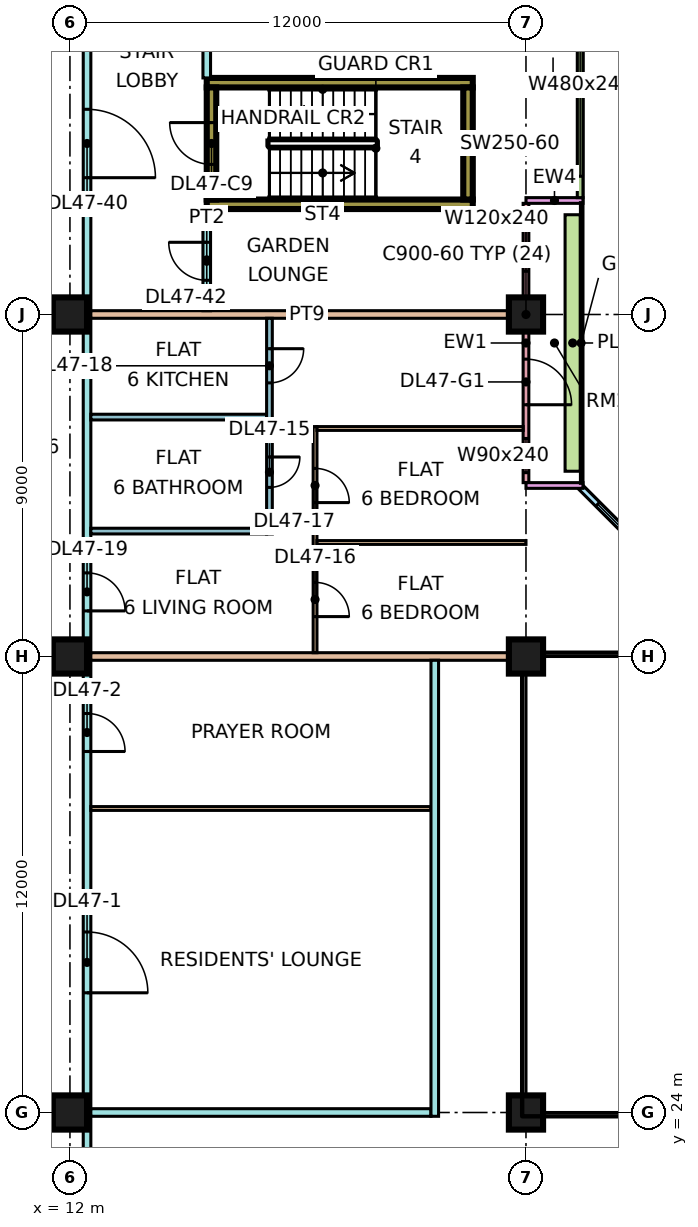
"""IFC4 building model, lengths in metres.
Left out: names, types, materials, properties, quantities, classifications, styles, units other than length and angle.
Written with IfcOpenShell. Run it as: python <this file> out.ifc"""

import sys

from ifc_helpers import new_model, si_unit, direction, frame, frame_2d, origin, origin_2d, place, context, subcontext, project, spatial, rectangle, extrude, element, fill, save


model = new_model("IFC4")
c1 = context("Model", 3, precision=1e-05, world=origin(), true_north=direction((0.0, 1.0)))
c2 = subcontext(c1, "Body", "Model", "MODEL_VIEW")
j1 = project(units=[si_unit("LENGTHUNIT", "METRE"), si_unit("PLANEANGLEUNIT", "RADIAN")], contexts=[c1])
p1 = place(None, origin())
s1 = spatial("IfcSite", under=j1, at=p1, CompositionType="ELEMENT")
p2 = place(p1, origin())
s2 = spatial("IfcBuilding", under=s1, at=p2, CompositionType="ELEMENT")
p3 = place(p2, frame((0.0, 0.0, 202.4)))
s3 = spatial("IfcBuildingStorey", under=s2, at=p3, CompositionType="ELEMENT", Elevation=202.4)
for number, where, z_axis, x_axis in (
    (1, (12.0, 24.0, 0.0), (0.0, 0.0, 1.0), (1.0, 0.0, 0.0)),
    (2, (12.0, 36.0, 0.0), (0.0, 0.0, 1.0), (1.0, 0.0, 0.0)),
    (3, (12.0, 45.0, 0.0), (0.0, 0.0, 1.0), (1.0, 0.0, 0.0)),
    (4, (24.0, 24.0, 0.0), (0.0, 0.0, 1.0), (1.0, 0.0, 0.0)),
    (5, (24.0, 36.0, 0.0), (0.0, 0.0, 1.0), (1.0, 0.0, 0.0)),
    (6, (24.0, 45.0, 0.0), (0.0, 0.0, 1.0), (1.0, 0.0, 0.0)),
):
    element("IfcColumn", number, at=place(p3, frame(where, z_axis=z_axis, x_axis=x_axis)), inside=s3, PredefinedType="COLUMN", context=c2, shape_type="SweptSolid", body=[
        extrude(rectangle(XDim=0.9, YDim=0.9, at=origin_2d()), origin(), (0.0, 0.0, 1.0), 3.75),
    ])
for number, where, z_axis, x_axis in (
    (7, (15.6, 47.9, 0.0), (0.0, 0.0, 1.0), (1.0, 0.0, 0.0)),
    (8, (15.6, 51.1, 0.0), (0.0, 0.0, 1.0), (1.0, 0.0, 0.0)),
):
    element("IfcWall", number, at=place(p3, frame(where, z_axis=z_axis, x_axis=x_axis)), inside=s3, PredefinedType="SHEAR", context=c2, shape_type="SweptSolid", body=[
        extrude(rectangle(XDim=7.0, YDim=0.25, at=frame_2d((3.5, 0.0))), origin(), (0.0, 0.0, 1.0), 3.75),
    ])
p4 = place(p3, frame((15.725, 48.025, 0.0), z_axis=(0.0, 0.0, 1.0), x_axis=(0.0, 1.0, 0.0)))
e9 = element("IfcWall", 9, at=p4, inside=s3, PredefinedType="SHEAR", context=c2, shape_type="SweptSolid", body=[
    extrude(rectangle(XDim=2.95, YDim=0.25, at=frame_2d((1.475, 0.0))), origin(), (0.0, 0.0, 1.0), 3.75),
])
p5 = place(p4, frame((0.925, 0.0, 0.0)))
e10 = element("IfcOpeningElement", 10, at=p5, cuts=e9, PredefinedType="OPENING", context=c2, shape_type="SweptSolid", body=[
    extrude(rectangle(XDim=1.1, YDim=2.2, at=frame_2d((0.55, 1.1))), frame((0.0, 0.135, 0.0), z_axis=(0.0, -1.0, 0.0), x_axis=(1.0, 0.0, 0.0)), (0.0, 0.0, 1.0), 0.27),
])
p6 = place(p3, frame((22.475, 48.025, 0.0), z_axis=(0.0, 0.0, 1.0), x_axis=(0.0, 1.0, 0.0)))
e11 = element("IfcWall", 11, at=p6, inside=s3, PredefinedType="SHEAR", context=c2, shape_type="SweptSolid", body=[
    extrude(rectangle(XDim=2.95, YDim=0.25, at=frame_2d((1.475, 0.0))), origin(), (0.0, 0.0, 1.0), 3.75),
])
p7 = place(p3, frame((28.447, 37.447, 0.0), z_axis=(0.0, 0.0, 1.0), x_axis=(-0.707106781187, 0.707106781187, 0.0)))
e12 = element("IfcWall", 12, at=p7, inside=s3, PredefinedType="SOLIDWALL", context=c2, shape_type="SweptSolid", body=[
    extrude(rectangle(XDim=4.243, YDim=0.15, at=frame_2d((2.121, 0.0))), origin(), (0.0, 0.0, 1.0), 3.3),
])
p8 = place(p7, frame((0.621, 0.0, 0.45)))
e13 = element("IfcOpeningElement", 13, at=p8, cuts=e12, PredefinedType="OPENING", context=c2, shape_type="SweptSolid", body=[
    extrude(rectangle(XDim=3.0, YDim=2.4, at=frame_2d((1.5, 1.2))), frame((0.0, 0.085, 0.0), z_axis=(0.0, -1.0, 0.0), x_axis=(1.0, 0.0, 0.0)), (0.0, 0.0, 1.0), 0.17),
])
p9 = place(p3, frame((24.0, 40.575, 0.0), z_axis=(0.0, 0.0, 1.0), x_axis=(0.0, 1.0, 0.0)))
e14 = element("IfcWall", 14, at=p9, inside=s3, PredefinedType="SOLIDWALL", context=c2, shape_type="SweptSolid", body=[
    extrude(rectangle(XDim=7.35, YDim=0.15, at=frame_2d((3.675, 0.0))), origin(), (0.0, 0.0, 1.0), 3.3),
])
p10 = place(p9, frame((0.262, 0.0, 0.45)))
e15 = element("IfcOpeningElement", 15, at=p10, cuts=e14, PredefinedType="OPENING", context=c2, shape_type="SweptSolid", body=[
    extrude(rectangle(XDim=0.9, YDim=2.4, at=frame_2d((0.45, 1.2))), frame((0.0, 0.085, 0.0), z_axis=(0.0, -1.0, 0.0), x_axis=(1.0, 0.0, 0.0)), (0.0, 0.0, 1.0), 0.17),
])
p11 = place(p9, frame((2.05, 0.0, 0.0)))
e16 = element("IfcOpeningElement", 16, at=p11, cuts=e14, PredefinedType="OPENING", context=c2, shape_type="SweptSolid", body=[
    extrude(rectangle(XDim=1.2, YDim=2.4, at=frame_2d((0.6, 1.2))), frame((0.0, 0.085, 0.0), z_axis=(0.0, -1.0, 0.0), x_axis=(1.0, 0.0, 0.0)), (0.0, 0.0, 1.0), 0.17),
])
p12 = place(p9, frame((5.562, 0.0, 0.45)))
e17 = element("IfcOpeningElement", 17, at=p12, cuts=e14, PredefinedType="OPENING", context=c2, shape_type="SweptSolid", body=[
    extrude(rectangle(XDim=1.2, YDim=2.4, at=frame_2d((0.6, 1.2))), frame((0.0, 0.085, 0.0), z_axis=(0.0, -1.0, 0.0), x_axis=(1.0, 0.0, 0.0)), (0.0, 0.0, 1.0), 0.17),
])
for number, where, z_axis, x_axis in (
    (18, (25.5, 40.5, 0.0), (0.0, 0.0, 1.0), (-1.0, 0.0, 0.0)),
    (19, (25.5, 48.0, 0.0), (0.0, 0.0, 1.0), (-1.0, 0.0, 0.0)),
):
    element("IfcWall", number, at=place(p3, frame(where, z_axis=z_axis, x_axis=x_axis)), inside=s3, PredefinedType="SOLIDWALL", context=c2, shape_type="SweptSolid", body=[
        extrude(rectangle(XDim=1.5, YDim=0.15, at=frame_2d((0.75, 0.0))), origin(), (0.0, 0.0, 1.0), 3.3),
    ])
p13 = place(p3, frame((25.425, 48.075, 0.0), z_axis=(0.0, 0.0, 1.0), x_axis=(0.0, 1.0, 0.0)))
e20 = element("IfcWall", 20, at=p13, inside=s3, PredefinedType="SOLIDWALL", context=c2, shape_type="SweptSolid", body=[
    extrude(rectangle(XDim=13.425, YDim=0.15, at=frame_2d((6.712, 0.0))), origin(), (0.0, 0.0, 1.0), 3.3),
])
p14 = place(p13, frame((0.562, 0.0, 0.45)))
e21 = element("IfcOpeningElement", 21, at=p14, cuts=e20, PredefinedType="OPENING", context=c2, shape_type="SweptSolid", body=[
    extrude(rectangle(XDim=4.8, YDim=2.4, at=frame_2d((2.4, 1.2))), frame((0.0, 0.085, 0.0), z_axis=(0.0, -1.0, 0.0), x_axis=(1.0, 0.0, 0.0)), (0.0, 0.0, 1.0), 0.17),
])
p15 = place(p13, frame((6.525, 0.0, 0.45)))
e22 = element("IfcOpeningElement", 22, at=p15, cuts=e20, PredefinedType="OPENING", context=c2, shape_type="SweptSolid", body=[
    extrude(rectangle(XDim=1.8, YDim=2.4, at=frame_2d((0.9, 1.2))), frame((0.0, 0.085, 0.0), z_axis=(0.0, -1.0, 0.0), x_axis=(1.0, 0.0, 0.0)), (0.0, 0.0, 1.0), 0.17),
])
p16 = place(p13, frame((9.525, 0.0, 0.45)))
e23 = element("IfcOpeningElement", 23, at=p16, cuts=e20, PredefinedType="OPENING", context=c2, shape_type="SweptSolid", body=[
    extrude(rectangle(XDim=1.8, YDim=2.4, at=frame_2d((0.9, 1.2))), frame((0.0, 0.085, 0.0), z_axis=(0.0, -1.0, 0.0), x_axis=(1.0, 0.0, 0.0)), (0.0, 0.0, 1.0), 0.17),
])
p17 = place(p13, frame((12.225, 0.0, 0.45)))
e24 = element("IfcOpeningElement", 24, at=p17, cuts=e20, PredefinedType="OPENING", context=c2, shape_type="SweptSolid", body=[
    extrude(rectangle(XDim=0.9, YDim=2.4, at=frame_2d((0.45, 1.2))), frame((0.0, 0.085, 0.0), z_axis=(0.0, -1.0, 0.0), x_axis=(1.0, 0.0, 0.0)), (0.0, 0.0, 1.0), 0.17),
])
p18 = place(p3, frame((25.229, 40.875, 0.0), z_axis=(0.0, 0.0, 1.0), x_axis=(0.0, 1.0, 0.0)))
e25 = element("IfcWall", 25, at=p18, inside=s3, PredefinedType="SOLIDWALL", context=c2, shape_type="SweptSolid", body=[
    extrude(rectangle(XDim=6.75, YDim=0.4, at=frame_2d((3.375, 0.0))), origin(), (0.0, 0.0, 1.0), 0.7),
])
p19 = place(p3, frame((12.45, 20.0, 0.0), z_axis=(0.0, 0.0, 1.0), x_axis=(0.0, 1.0, 0.0)))
e26 = element("IfcWall", 26, at=p19, inside=s3, PredefinedType="PARTITIONING", context=c2, shape_type="SweptSolid", body=[
    extrude(rectangle(XDim=42.926, YDim=0.2, at=frame_2d((21.463, 0.0))), origin(), (0.0, 0.0, 1.0), 3.3),
])
p20 = place(p19, frame((7.15, 0.0, 0.0)))
e27 = element("IfcOpeningElement", 27, at=p20, cuts=e26, PredefinedType="OPENING", context=c2, shape_type="SweptSolid", body=[
    extrude(rectangle(XDim=1.6, YDim=2.1, at=frame_2d((0.8, 1.05))), frame((0.0, 0.11, 0.0), z_axis=(0.0, -1.0, 0.0), x_axis=(1.0, 0.0, 0.0)), (0.0, 0.0, 1.0), 0.22),
])
p21 = place(p19, frame((13.5, 0.0, 0.0)))
e28 = element("IfcOpeningElement", 28, at=p21, cuts=e26, PredefinedType="OPENING", context=c2, shape_type="SweptSolid", body=[
    extrude(rectangle(XDim=1.0, YDim=2.1, at=frame_2d((0.5, 1.05))), frame((0.0, 0.11, 0.0), z_axis=(0.0, -1.0, 0.0), x_axis=(1.0, 0.0, 0.0)), (0.0, 0.0, 1.0), 0.22),
])
p22 = place(p19, frame((17.2, 0.0, 0.0)))
e29 = element("IfcOpeningElement", 29, at=p22, cuts=e26, PredefinedType="OPENING", context=c2, shape_type="SweptSolid", body=[
    extrude(rectangle(XDim=1.0, YDim=2.1, at=frame_2d((0.5, 1.05))), frame((0.0, 0.11, 0.0), z_axis=(0.0, -1.0, 0.0), x_axis=(1.0, 0.0, 0.0)), (0.0, 0.0, 1.0), 0.22),
])
p23 = place(p19, frame((35.2, 0.0, 0.0)))
e30 = element("IfcOpeningElement", 30, at=p23, cuts=e26, PredefinedType="OPENING", context=c2, shape_type="SweptSolid", body=[
    extrude(rectangle(XDim=1.0, YDim=2.1, at=frame_2d((0.5, 1.05))), frame((0.0, 0.11, 0.0), z_axis=(0.0, -1.0, 0.0), x_axis=(1.0, 0.0, 0.0)), (0.0, 0.0, 1.0), 0.22),
])
p24 = place(p19, frame((1.15, 0.0, 0.0)))
e31 = element("IfcOpeningElement", 31, at=p24, cuts=e26, PredefinedType="OPENING", context=c2, shape_type="SweptSolid", body=[
    extrude(rectangle(XDim=1.8, YDim=2.1, at=frame_2d((0.9, 1.05))), frame((0.0, 0.11, 0.0), z_axis=(0.0, -1.0, 0.0), x_axis=(1.0, 0.0, 0.0)), (0.0, 0.0, 1.0), 0.22),
])
p25 = place(p19, frame((28.6, 0.0, 0.0)))
e32 = element("IfcOpeningElement", 32, at=p25, cuts=e26, PredefinedType="OPENING", context=c2, shape_type="SweptSolid", body=[
    extrude(rectangle(XDim=1.8, YDim=2.1, at=frame_2d((0.9, 1.05))), frame((0.0, 0.11, 0.0), z_axis=(0.0, -1.0, 0.0), x_axis=(1.0, 0.0, 0.0)), (0.0, 0.0, 1.0), 0.22),
])
p26 = place(p3, frame((12.55, 24.0, 0.0), z_axis=(0.0, 0.0, 1.0), x_axis=(1.0, 0.0, 0.0)))
e33 = element("IfcWall", 33, at=p26, inside=s3, PredefinedType="PARTITIONING", context=c2, shape_type="SweptSolid", body=[
    extrude(rectangle(XDim=8.95, YDim=0.2, at=frame_2d((4.475, 0.0))), origin(), (0.0, 0.0, 1.0), 3.3),
])
p27 = place(p3, frame((12.55, 32.0, 0.0), z_axis=(0.0, 0.0, 1.0), x_axis=(1.0, 0.0, 0.0)))
e34 = element("IfcWall", 34, at=p27, inside=s3, PredefinedType="PARTITIONING", context=c2, shape_type="SweptSolid", body=[
    extrude(rectangle(XDim=8.95, YDim=0.1, at=frame_2d((4.475, 0.0))), origin(), (0.0, 0.0, 1.0), 3.3),
])
p28 = place(p3, frame((12.55, 36.0, 0.0), z_axis=(0.0, 0.0, 1.0), x_axis=(1.0, 0.0, 0.0)))
e35 = element("IfcWall", 35, at=p28, inside=s3, PredefinedType="PARTITIONING", context=c2, shape_type="SweptSolid", body=[
    extrude(rectangle(XDim=11.45, YDim=0.2, at=frame_2d((5.725, 0.0))), origin(), (0.0, 0.0, 1.0), 3.3),
])
for number, where, z_axis, x_axis in (
    (36, (12.55, 39.3, 0.0), (0.0, 0.0, 1.0), (1.0, 0.0, 0.0)),
    (37, (12.55, 42.3, 0.0), (0.0, 0.0, 1.0), (1.0, 0.0, 0.0)),
):
    element("IfcWall", number, at=place(p3, frame(where, z_axis=z_axis, x_axis=x_axis)), inside=s3, PredefinedType="PARTITIONING", context=c2, shape_type="SweptSolid", body=[
        extrude(rectangle(XDim=4.625, YDim=0.15, at=frame_2d((2.312, 0.0))), origin(), (0.0, 0.0, 1.0), 3.3),
    ])
p29 = place(p3, frame((12.55, 45.0, 0.0), z_axis=(0.0, 0.0, 1.0), x_axis=(1.0, 0.0, 0.0)))
e38 = element("IfcWall", 38, at=p29, inside=s3, PredefinedType="PARTITIONING", context=c2, shape_type="SweptSolid", body=[
    extrude(rectangle(XDim=11.376, YDim=0.2, at=frame_2d((5.688, 0.0))), origin(), (0.0, 0.0, 1.0), 3.3),
])
p30 = place(p3, frame((15.6, 45.1, 0.0), z_axis=(0.0, 0.0, 1.0), x_axis=(0.0, 1.0, 0.0)))
e39 = element("IfcWall", 39, at=p30, inside=s3, PredefinedType="PARTITIONING", context=c2, shape_type="SweptSolid", body=[
    extrude(rectangle(XDim=2.675, YDim=0.2, at=frame_2d((1.337, 0.0))), origin(), (0.0, 0.0, 1.0), 3.3),
])
p31 = place(p30, frame((0.8, 0.0, 0.0)))
e40 = element("IfcOpeningElement", 40, at=p31, cuts=e39, PredefinedType="OPENING", context=c2, shape_type="SweptSolid", body=[
    extrude(rectangle(XDim=1.0, YDim=2.1, at=frame_2d((0.5, 1.05))), frame((0.0, 0.11, 0.0), z_axis=(0.0, -1.0, 0.0), x_axis=(1.0, 0.0, 0.0)), (0.0, 0.0, 1.0), 0.22),
])
p32 = place(p3, frame((15.6, 51.225, 0.0), z_axis=(0.0, 0.0, 1.0), x_axis=(0.0, 1.0, 0.0)))
e41 = element("IfcWall", 41, at=p32, inside=s3, PredefinedType="PARTITIONING", context=c2, shape_type="SweptSolid", body=[
    extrude(rectangle(XDim=2.675, YDim=0.2, at=frame_2d((1.337, 0.0))), origin(), (0.0, 0.0, 1.0), 3.3),
])
p33 = place(p3, frame((17.25, 39.225, 0.0), z_axis=(0.0, 0.0, 1.0), x_axis=(0.0, 1.0, 0.0)))
e42 = element("IfcWall", 42, at=p33, inside=s3, PredefinedType="PARTITIONING", context=c2, shape_type="SweptSolid", body=[
    extrude(rectangle(XDim=5.675, YDim=0.15, at=frame_2d((2.837, 0.0))), origin(), (0.0, 0.0, 1.0), 3.3),
])
p34 = place(p33, frame((1.225, 0.0, 0.0)))
e43 = element("IfcOpeningElement", 43, at=p34, cuts=e42, PredefinedType="OPENING", context=c2, shape_type="SweptSolid", body=[
    extrude(rectangle(XDim=0.8, YDim=2.1, at=frame_2d((0.4, 1.05))), frame((0.0, 0.085, 0.0), z_axis=(0.0, -1.0, 0.0), x_axis=(1.0, 0.0, 0.0)), (0.0, 0.0, 1.0), 0.17),
])
p35 = place(p33, frame((3.975, 0.0, 0.0)))
e44 = element("IfcOpeningElement", 44, at=p35, cuts=e42, PredefinedType="OPENING", context=c2, shape_type="SweptSolid", body=[
    extrude(rectangle(XDim=0.9, YDim=2.1, at=frame_2d((0.45, 1.05))), frame((0.0, 0.085, 0.0), z_axis=(0.0, -1.0, 0.0), x_axis=(1.0, 0.0, 0.0)), (0.0, 0.0, 1.0), 0.17),
])
p36 = place(p3, frame((18.45, 36.1, 0.0), z_axis=(0.0, 0.0, 1.0), x_axis=(0.0, 1.0, 0.0)))
e45 = element("IfcWall", 45, at=p36, inside=s3, PredefinedType="PARTITIONING", context=c2, shape_type="SweptSolid", body=[
    extrude(rectangle(XDim=5.95, YDim=0.1, at=frame_2d((2.975, 0.0))), origin(), (0.0, 0.0, 1.0), 3.3),
])
p37 = place(p36, frame((0.95, 0.0, 0.0)))
e46 = element("IfcOpeningElement", 46, at=p37, cuts=e45, PredefinedType="OPENING", context=c2, shape_type="SweptSolid", body=[
    extrude(rectangle(XDim=0.9, YDim=2.1, at=frame_2d((0.45, 1.05))), frame((0.0, 0.06, 0.0), z_axis=(0.0, -1.0, 0.0), x_axis=(1.0, 0.0, 0.0)), (0.0, 0.0, 1.0), 0.12),
])
p38 = place(p36, frame((3.95, 0.0, 0.0)))
e47 = element("IfcOpeningElement", 47, at=p38, cuts=e45, PredefinedType="OPENING", context=c2, shape_type="SweptSolid", body=[
    extrude(rectangle(XDim=0.9, YDim=2.1, at=frame_2d((0.45, 1.05))), frame((0.0, 0.06, 0.0), z_axis=(0.0, -1.0, 0.0), x_axis=(1.0, 0.0, 0.0)), (0.0, 0.0, 1.0), 0.12),
])
p39 = place(p3, frame((18.5, 39.0, 0.0), z_axis=(0.0, 0.0, 1.0), x_axis=(1.0, 0.0, 0.0)))
e48 = element("IfcWall", 48, at=p39, inside=s3, PredefinedType="PARTITIONING", context=c2, shape_type="SweptSolid", body=[
    extrude(rectangle(XDim=5.5, YDim=0.1, at=frame_2d((2.75, 0.0))), origin(), (0.0, 0.0, 1.0), 3.3),
])
p40 = place(p3, frame((18.5, 42.0, 0.0), z_axis=(0.0, 0.0, 1.0), x_axis=(1.0, 0.0, 0.0)))
e49 = element("IfcWall", 49, at=p40, inside=s3, PredefinedType="PARTITIONING", context=c2, shape_type="SweptSolid", body=[
    extrude(rectangle(XDim=5.426, YDim=0.1, at=frame_2d((2.713, 0.0))), origin(), (0.0, 0.0, 1.0), 3.3),
])
p41 = place(p3, frame((21.6, 23.9, 0.0), z_axis=(0.0, 0.0, 1.0), x_axis=(0.0, 1.0, 0.0)))
e50 = element("IfcWall", 50, at=p41, inside=s3, PredefinedType="PARTITIONING", context=c2, shape_type="SweptSolid", body=[
    extrude(rectangle(XDim=12.0, YDim=0.2, at=frame_2d((6.0, 0.0))), origin(), (0.0, 0.0, 1.0), 3.3),
])
p42 = place(p8, origin())
e51 = element("IfcWindow", 51, at=p42, inside=s3, PartitioningType="SINGLE_PANEL", PredefinedType="WINDOW", context=c2, shape_type="SweptSolid", body=[
    extrude(rectangle(XDim=3.0, YDim=2.4, at=frame_2d((1.5, 1.2))), frame((0.0, 0.03, 0.0), z_axis=(0.0, -1.0, 0.0), x_axis=(1.0, 0.0, 0.0)), (0.0, 0.0, 1.0), 0.06),
])
fill(e13, e51)
p43 = place(p10, origin())
e52 = element("IfcWindow", 52, at=p43, inside=s3, PartitioningType="SINGLE_PANEL", PredefinedType="WINDOW", context=c2, shape_type="SweptSolid", body=[
    extrude(rectangle(XDim=0.9, YDim=2.4, at=frame_2d((0.45, 1.2))), frame((0.0, 0.03, 0.0), z_axis=(0.0, -1.0, 0.0), x_axis=(1.0, 0.0, 0.0)), (0.0, 0.0, 1.0), 0.06),
])
fill(e15, e52)
p44 = place(p11, frame((1.2, 0.0, 0.0), z_axis=(0.0, 0.0, 1.0), x_axis=(-1.0, 0.0, 0.0)))
e53 = element("IfcDoor", 53, at=p44, inside=s3, OperationType="DOUBLE_DOOR_SINGLE_SWING", PredefinedType="DOOR", context=c2, shape_type="SweptSolid", body=[
    extrude(rectangle(XDim=1.2, YDim=2.4, at=frame_2d((0.6, 1.2))), frame((0.0, 0.025, 0.0), z_axis=(0.0, -1.0, 0.0), x_axis=(1.0, 0.0, 0.0)), (0.0, 0.0, 1.0), 0.05),
])
fill(e16, e53)
p45 = place(p12, origin())
e54 = element("IfcWindow", 54, at=p45, inside=s3, PartitioningType="SINGLE_PANEL", PredefinedType="WINDOW", context=c2, shape_type="SweptSolid", body=[
    extrude(rectangle(XDim=1.2, YDim=2.4, at=frame_2d((0.6, 1.2))), frame((0.0, 0.03, 0.0), z_axis=(0.0, -1.0, 0.0), x_axis=(1.0, 0.0, 0.0)), (0.0, 0.0, 1.0), 0.06),
])
fill(e17, e54)
p46 = place(p14, origin())
e55 = element("IfcWindow", 55, at=p46, inside=s3, PartitioningType="SINGLE_PANEL", PredefinedType="WINDOW", context=c2, shape_type="SweptSolid", body=[
    extrude(rectangle(XDim=4.8, YDim=2.4, at=frame_2d((2.4, 1.2))), frame((0.0, 0.03, 0.0), z_axis=(0.0, -1.0, 0.0), x_axis=(1.0, 0.0, 0.0)), (0.0, 0.0, 1.0), 0.06),
])
fill(e21, e55)
p47 = place(p5, frame((1.1, 0.0, 0.0), z_axis=(0.0, 0.0, 1.0), x_axis=(-1.0, 0.0, 0.0)))
e56 = element("IfcDoor", 56, at=p47, inside=s3, OperationType="SINGLE_SWING_RIGHT", PredefinedType="DOOR", context=c2, shape_type="SweptSolid", body=[
    extrude(rectangle(XDim=1.1, YDim=2.2, at=frame_2d((0.55, 1.1))), frame((0.0, 0.025, 0.0), z_axis=(0.0, -1.0, 0.0), x_axis=(1.0, 0.0, 0.0)), (0.0, 0.0, 1.0), 0.05),
])
fill(e10, e56)
p48 = place(p20, frame((1.6, 0.0, 0.0), z_axis=(0.0, 0.0, 1.0), x_axis=(-1.0, 0.0, 0.0)))
e57 = element("IfcDoor", 57, at=p48, inside=s3, OperationType="DOUBLE_DOOR_SINGLE_SWING", PredefinedType="DOOR", context=c2, shape_type="SweptSolid", body=[
    extrude(rectangle(XDim=1.6, YDim=2.1, at=frame_2d((0.8, 1.05))), frame((0.0, 0.025, 0.0), z_axis=(0.0, -1.0, 0.0), x_axis=(1.0, 0.0, 0.0)), (0.0, 0.0, 1.0), 0.05),
])
fill(e27, e57)
p49 = place(p21, frame((1.0, 0.0, 0.0), z_axis=(0.0, 0.0, 1.0), x_axis=(-1.0, 0.0, 0.0)))
e58 = element("IfcDoor", 58, at=p49, inside=s3, OperationType="SINGLE_SWING_LEFT", PredefinedType="DOOR", context=c2, shape_type="SweptSolid", body=[
    extrude(rectangle(XDim=1.0, YDim=2.1, at=frame_2d((0.5, 1.05))), frame((0.0, 0.025, 0.0), z_axis=(0.0, -1.0, 0.0), x_axis=(1.0, 0.0, 0.0)), (0.0, 0.0, 1.0), 0.05),
])
fill(e28, e58)
p50 = place(p34, origin())
e59 = element("IfcDoor", 59, at=p50, inside=s3, OperationType="SINGLE_SWING_RIGHT", PredefinedType="DOOR", context=c2, shape_type="SweptSolid", body=[
    extrude(rectangle(XDim=0.8, YDim=2.1, at=frame_2d((0.4, 1.05))), frame((0.0, 0.025, 0.0), z_axis=(0.0, -1.0, 0.0), x_axis=(1.0, 0.0, 0.0)), (0.0, 0.0, 1.0), 0.05),
])
fill(e43, e59)
p51 = place(p37, frame((0.9, 0.0, 0.0), z_axis=(0.0, 0.0, 1.0), x_axis=(-1.0, 0.0, 0.0)))
e60 = element("IfcDoor", 60, at=p51, inside=s3, OperationType="SINGLE_SWING_LEFT", PredefinedType="DOOR", context=c2, shape_type="SweptSolid", body=[
    extrude(rectangle(XDim=0.9, YDim=2.1, at=frame_2d((0.45, 1.05))), frame((0.0, 0.025, 0.0), z_axis=(0.0, -1.0, 0.0), x_axis=(1.0, 0.0, 0.0)), (0.0, 0.0, 1.0), 0.05),
])
fill(e46, e60)
p52 = place(p38, frame((0.9, 0.0, 0.0), z_axis=(0.0, 0.0, 1.0), x_axis=(-1.0, 0.0, 0.0)))
e61 = element("IfcDoor", 61, at=p52, inside=s3, OperationType="SINGLE_SWING_LEFT", PredefinedType="DOOR", context=c2, shape_type="SweptSolid", body=[
    extrude(rectangle(XDim=0.9, YDim=2.1, at=frame_2d((0.45, 1.05))), frame((0.0, 0.025, 0.0), z_axis=(0.0, -1.0, 0.0), x_axis=(1.0, 0.0, 0.0)), (0.0, 0.0, 1.0), 0.05),
])
fill(e47, e61)
p53 = place(p35, origin())
e62 = element("IfcDoor", 62, at=p53, inside=s3, OperationType="SINGLE_SWING_RIGHT", PredefinedType="DOOR", context=c2, shape_type="SweptSolid", body=[
    extrude(rectangle(XDim=0.9, YDim=2.1, at=frame_2d((0.45, 1.05))), frame((0.0, 0.025, 0.0), z_axis=(0.0, -1.0, 0.0), x_axis=(1.0, 0.0, 0.0)), (0.0, 0.0, 1.0), 0.05),
])
fill(e44, e62)
p54 = place(p22, frame((1.0, 0.0, 0.0), z_axis=(0.0, 0.0, 1.0), x_axis=(-1.0, 0.0, 0.0)))
e63 = element("IfcDoor", 63, at=p54, inside=s3, OperationType="SINGLE_SWING_LEFT", PredefinedType="DOOR", context=c2, shape_type="SweptSolid", body=[
    extrude(rectangle(XDim=1.0, YDim=2.1, at=frame_2d((0.5, 1.05))), frame((0.0, 0.025, 0.0), z_axis=(0.0, -1.0, 0.0), x_axis=(1.0, 0.0, 0.0)), (0.0, 0.0, 1.0), 0.05),
])
fill(e29, e63)
p55 = place(p25, frame((1.8, 0.0, 0.0), z_axis=(0.0, 0.0, 1.0), x_axis=(-1.0, 0.0, 0.0)))
e64 = element("IfcDoor", 64, at=p55, inside=s3, OperationType="DOUBLE_DOOR_SINGLE_SWING", PredefinedType="DOOR", context=c2, shape_type="SweptSolid", body=[
    extrude(rectangle(XDim=1.8, YDim=2.1, at=frame_2d((0.9, 1.05))), frame((0.0, 0.025, 0.0), z_axis=(0.0, -1.0, 0.0), x_axis=(1.0, 0.0, 0.0)), (0.0, 0.0, 1.0), 0.05),
])
fill(e32, e64)
p56 = place(p31, frame((1.0, 0.0, 0.0), z_axis=(0.0, 0.0, 1.0), x_axis=(-1.0, 0.0, 0.0)))
e65 = element("IfcDoor", 65, at=p56, inside=s3, OperationType="SINGLE_SWING_RIGHT", PredefinedType="DOOR", context=c2, shape_type="SweptSolid", body=[
    extrude(rectangle(XDim=1.0, YDim=2.1, at=frame_2d((0.5, 1.05))), frame((0.0, 0.025, 0.0), z_axis=(0.0, -1.0, 0.0), x_axis=(1.0, 0.0, 0.0)), (0.0, 0.0, 1.0), 0.05),
])
fill(e40, e65)
save(model, sys.argv[1])
